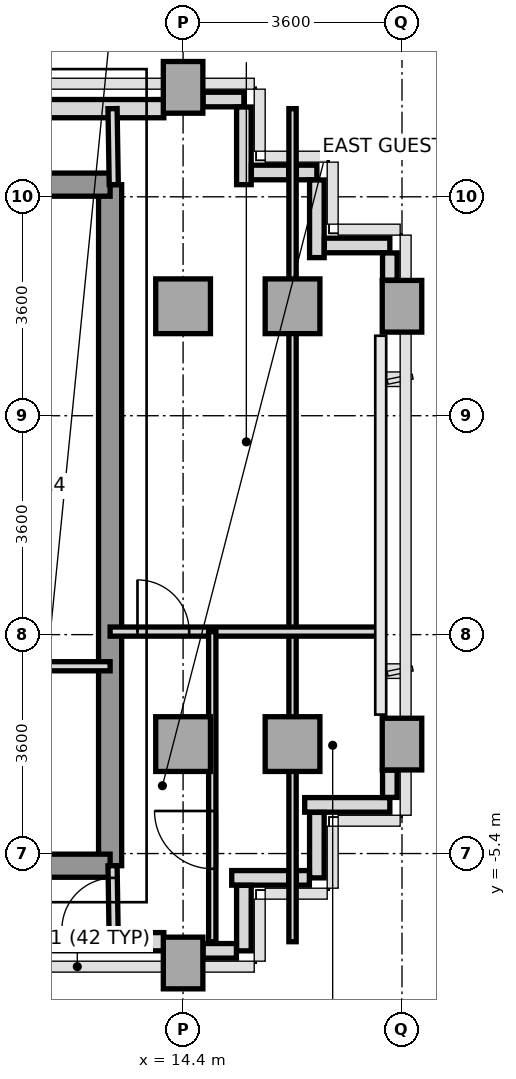
"""IFC4 building model, lengths in metres.
Left out: names, types, materials, properties, quantities, classifications, styles, units other than length and angle.
Written with IfcOpenShell. Run it as: python <this file> out.ifc"""

import sys

from ifc_helpers import new_model, si_unit, direction, frame, frame_2d, origin, origin_2d, place, context, subcontext, project, spatial, rectangle, extrude, source, transform, mapped, element, fill, save


model = new_model("IFC4")
c1 = context("Model", 3, precision=1e-05, world=origin(), true_north=direction((0.0, 1.0)))
c2 = subcontext(c1, "Body", "Model", "MODEL_VIEW")
j1 = project(units=[si_unit("LENGTHUNIT", "METRE"), si_unit("PLANEANGLEUNIT", "RADIAN")], contexts=[c1])
p1 = place(None, origin())
s1 = spatial("IfcSite", under=j1, at=p1, CompositionType="ELEMENT")
p2 = place(p1, origin())
s2 = spatial("IfcBuilding", under=s1, at=p2, CompositionType="ELEMENT")
p3 = place(p2, frame((0.0, 0.0, 191.0)))
s3 = spatial("IfcBuildingStorey", under=s2, at=p3, CompositionType="ELEMENT", Elevation=191.0)
m1 = source(origin(), c2, "Body", "SweptSolid", [
    extrude(rectangle(XDim=0.65, YDim=0.85, at=origin_2d()), origin(), (0.0, 0.0, 1.0), 3.2),
])
p4 = place(p3, frame((14.4, -7.2, 0.0), z_axis=(0.0, 0.0, 1.0), x_axis=(1.0, 0.0, 0.0)))
e1 = element("IfcColumn", 1, at=p4, inside=s3, PredefinedType="COLUMN", context=c2, shape_type="MappedRepresentation", body=[
    mapped(m1, transform((0.0, 0.0, 0.0), x_axis=(1.0, 0.0, 0.0), y_axis=(0.0, 1.0, 0.0), z_axis=(0.0, 0.0, 1.0), scale=1.0)),
])
m2 = source(origin(), c2, "Body", "SweptSolid", [
    extrude(rectangle(XDim=0.9, YDim=0.9, at=origin_2d()), origin(), (0.0, 0.0, 1.0), 3.2),
])
for number, where, z_axis, x_axis in (
    (2, (14.4, -3.6, 0.0), (0.0, 0.0, 1.0), (1.0, 0.0, 0.0)),
    (3, (14.4, 3.6, 0.0), (0.0, 0.0, 1.0), (1.0, 0.0, 0.0)),
):
    element("IfcColumn", number, at=place(p3, frame(where, z_axis=z_axis, x_axis=x_axis)), inside=s3, PredefinedType="COLUMN", context=c2, shape_type="MappedRepresentation", body=[
        mapped(m2, transform((0.0, 0.0, 0.0), x_axis=(1.0, 0.0, 0.0), y_axis=(0.0, 1.0, 0.0), z_axis=(0.0, 0.0, 1.0), scale=1.0)),
    ])
p5 = place(p3, frame((14.4, 7.2, 0.0), z_axis=(0.0, 0.0, 1.0), x_axis=(1.0, 0.0, 0.0)))
e4 = element("IfcColumn", 4, at=p5, inside=s3, PredefinedType="COLUMN", context=c2, shape_type="MappedRepresentation", body=[
    mapped(m1, transform((0.0, 0.0, 0.0), x_axis=(1.0, 0.0, 0.0), y_axis=(0.0, 1.0, 0.0), z_axis=(0.0, 0.0, 1.0), scale=1.0)),
])
for number, where, z_axis, x_axis in (
    (5, (16.2, -3.6, 0.0), (0.0, 0.0, 1.0), (1.0, 0.0, 0.0)),
    (6, (16.2, 3.6, 0.0), (0.0, 0.0, 1.0), (1.0, 0.0, 0.0)),
):
    element("IfcColumn", number, at=place(p3, frame(where, z_axis=z_axis, x_axis=x_axis)), inside=s3, PredefinedType="COLUMN", context=c2, shape_type="MappedRepresentation", body=[
        mapped(m2, transform((0.0, 0.0, 0.0), x_axis=(1.0, 0.0, 0.0), y_axis=(0.0, 1.0, 0.0), z_axis=(0.0, 0.0, 1.0), scale=1.0)),
    ])
for number, where, z_axis, x_axis in (
    (7, (18.0, -3.6, 0.0), (0.0, 0.0, 1.0), (1.0, 0.0, 0.0)),
    (8, (18.0, 3.6, 0.0), (0.0, 0.0, 1.0), (1.0, 0.0, 0.0)),
):
    element("IfcColumn", number, at=place(p3, frame(where, z_axis=z_axis, x_axis=x_axis)), inside=s3, PredefinedType="COLUMN", context=c2, shape_type="MappedRepresentation", body=[
        mapped(m1, transform((0.0, 0.0, 0.0), x_axis=(1.0, 0.0, 0.0), y_axis=(0.0, 1.0, 0.0), z_axis=(0.0, 0.0, 1.0), scale=1.0)),
    ])
p6 = place(p3, frame((11.448, 6.85, 0.0), z_axis=(0.0, 0.0, 1.0), x_axis=(1.0, 0.0, 0.0)))
e9 = element("IfcWall", 9, at=p6, inside=s3, PredefinedType="SOLIDWALL", context=c2, shape_type="SweptSolid", body=[
    extrude(rectangle(XDim=2.635, YDim=0.3, at=frame_2d((1.317, 0.0))), origin(), (0.0, 0.0, 1.0), 3.2),
])
p7 = place(p3, frame((11.75, -6.85, 0.0), z_axis=(0.0, 0.0, 1.0), x_axis=(1.0, 0.0, 0.0)))
e10 = element("IfcWall", 10, at=p7, inside=s3, PredefinedType="SOLIDWALL", context=c2, shape_type="SweptSolid", body=[
    extrude(rectangle(XDim=2.333, YDim=0.3, at=frame_2d((1.167, 0.0))), origin(), (0.0, 0.0, 1.0), 3.2),
])
p8 = place(p3, frame((17.8, -4.6, 0.0), z_axis=(0.0, 0.0, 1.0), x_axis=(-1.0, 0.0, 0.0)))
e11 = element("IfcWall", 11, at=p8, inside=s3, PredefinedType="PARAPET", context=c2, shape_type="SweptSolid", body=[
    extrude(rectangle(XDim=1.4, YDim=0.24, at=frame_2d((0.7, 0.0))), origin(), (0.0, 0.0, 1.0), 1.15),
])
p9 = place(p3, frame((16.6, -4.723, 0.0), z_axis=(0.0, 0.0, 1.0), x_axis=(0.0, -1.0, 0.0)))
e12 = element("IfcWall", 12, at=p9, inside=s3, PredefinedType="PARAPET", context=c2, shape_type="SweptSolid", body=[
    extrude(rectangle(XDim=1.077, YDim=0.24, at=frame_2d((0.539, 0.0))), origin(), (0.0, 0.0, 1.0), 1.15),
])
p10 = place(p3, frame((16.477, -5.8, 0.0), z_axis=(0.0, 0.0, 1.0), x_axis=(-1.0, 0.0, 0.0)))
e13 = element("IfcWall", 13, at=p10, inside=s3, PredefinedType="PARAPET", context=c2, shape_type="SweptSolid", body=[
    extrude(rectangle(XDim=0.214, YDim=0.24, at=frame_2d((0.107, 0.0))), origin(), (0.0, 0.0, 1.0), 1.15),
])
p11 = place(p3, frame((16.137, -5.8, 0.0), z_axis=(0.0, 0.0, 1.0), x_axis=(-1.0, 0.0, 0.0)))
e14 = element("IfcWall", 14, at=p11, inside=s3, PredefinedType="PARAPET", context=c2, shape_type="SweptSolid", body=[
    extrude(rectangle(XDim=0.937, YDim=0.24, at=frame_2d((0.469, 0.0))), origin(), (0.0, 0.0, 1.0), 1.15),
])
p12 = place(p3, frame((15.4, -5.923, 0.0), z_axis=(0.0, 0.0, 1.0), x_axis=(0.0, -1.0, 0.0)))
e15 = element("IfcWall", 15, at=p12, inside=s3, PredefinedType="PARAPET", context=c2, shape_type="SweptSolid", body=[
    extrude(rectangle(XDim=1.077, YDim=0.24, at=frame_2d((0.539, 0.0))), origin(), (0.0, 0.0, 1.0), 1.15),
])
p13 = place(p3, frame((15.277, -7.0, 0.0), z_axis=(0.0, 0.0, 1.0), x_axis=(-1.0, 0.0, 0.0)))
e16 = element("IfcWall", 16, at=p13, inside=s3, PredefinedType="PARAPET", context=c2, shape_type="SweptSolid", body=[
    extrude(rectangle(XDim=0.549, YDim=0.24, at=frame_2d((0.274, 0.0))), origin(), (0.0, 0.0, 1.0), 1.15),
])
p14 = place(p3, frame((14.728, 7.0, 0.0), z_axis=(0.0, 0.0, 1.0), x_axis=(1.0, 0.0, 0.0)))
e17 = element("IfcWall", 17, at=p14, inside=s3, PredefinedType="PARAPET", context=c2, shape_type="SweptSolid", body=[
    extrude(rectangle(XDim=0.672, YDim=0.24, at=frame_2d((0.336, 0.0))), origin(), (0.0, 0.0, 1.0), 1.15),
])
p15 = place(p3, frame((15.4, 6.877, 0.0), z_axis=(0.0, 0.0, 1.0), x_axis=(0.0, -1.0, 0.0)))
e18 = element("IfcWall", 18, at=p15, inside=s3, PredefinedType="PARAPET", context=c2, shape_type="SweptSolid", body=[
    extrude(rectangle(XDim=1.277, YDim=0.24, at=frame_2d((0.638, 0.0))), origin(), (0.0, 0.0, 1.0), 1.15),
])
p16 = place(p3, frame((15.523, 5.8, 0.0), z_axis=(0.0, 0.0, 1.0), x_axis=(1.0, 0.0, 0.0)))
e19 = element("IfcWall", 19, at=p16, inside=s3, PredefinedType="PARAPET", context=c2, shape_type="SweptSolid", body=[
    extrude(rectangle(XDim=0.614, YDim=0.24, at=frame_2d((0.307, 0.0))), origin(), (0.0, 0.0, 1.0), 1.15),
])
p17 = place(p3, frame((16.263, 5.8, 0.0), z_axis=(0.0, 0.0, 1.0), x_axis=(1.0, 0.0, 0.0)))
e20 = element("IfcWall", 20, at=p17, inside=s3, PredefinedType="PARAPET", context=c2, shape_type="SweptSolid", body=[
    extrude(rectangle(XDim=0.337, YDim=0.24, at=frame_2d((0.168, 0.0))), origin(), (0.0, 0.0, 1.0), 1.15),
])
p18 = place(p3, frame((16.6, 5.677, 0.0), z_axis=(0.0, 0.0, 1.0), x_axis=(0.0, -1.0, 0.0)))
e21 = element("IfcWall", 21, at=p18, inside=s3, PredefinedType="PARAPET", context=c2, shape_type="SweptSolid", body=[
    extrude(rectangle(XDim=1.277, YDim=0.24, at=frame_2d((0.639, 0.0))), origin(), (0.0, 0.0, 1.0), 1.15),
])
p19 = place(p3, frame((16.723, 4.6, 0.0), z_axis=(0.0, 0.0, 1.0), x_axis=(1.0, 0.0, 0.0)))
e22 = element("IfcWall", 22, at=p19, inside=s3, PredefinedType="PARAPET", context=c2, shape_type="SweptSolid", body=[
    extrude(rectangle(XDim=1.077, YDim=0.24, at=frame_2d((0.539, 0.0))), origin(), (0.0, 0.0, 1.0), 1.15),
])
for number, where, z_axis, x_axis in (
    (23, (17.8, 4.477, 0.0), (0.0, 0.0, 1.0), (0.0, -1.0, 0.0)),
    (24, (17.8, -4.028, 0.0), (0.0, 0.0, 1.0), (0.0, -1.0, 0.0)),
):
    element("IfcWall", number, at=place(p3, frame(where, z_axis=z_axis, x_axis=x_axis)), inside=s3, PredefinedType="PARAPET", context=c2, shape_type="SweptSolid", body=[
        extrude(rectangle(XDim=0.449, YDim=0.24, at=frame_2d((0.225, 0.0))), origin(), (0.0, 0.0, 1.0), 1.15),
    ])
p20 = place(p3, frame((13.2, -5.6, 0.0), z_axis=(0.0, 0.0, 1.0), x_axis=(0.0, 1.0, 0.0)))
e25 = element("IfcWall", 25, at=p20, inside=s3, PredefinedType="SHEAR", context=c2, shape_type="SweptSolid", body=[
    extrude(rectangle(XDim=11.2, YDim=0.38, at=frame_2d((5.6, 0.0))), origin(), (0.0, 0.0, 1.0), 3.2),
])
p21 = place(p3, frame((11.356, 5.6, 0.0), z_axis=(0.0, 0.0, 1.0), x_axis=(1.0, 0.0, 0.0)))
e26 = element("IfcWall", 26, at=p21, inside=s3, PredefinedType="SHEAR", context=c2, shape_type="SweptSolid", body=[
    extrude(rectangle(XDim=1.844, YDim=0.38, at=frame_2d((0.922, 0.0))), origin(), (0.0, 0.0, 1.0), 3.2),
])
p22 = place(p3, frame((5.4, -5.6, 0.0), z_axis=(0.0, 0.0, 1.0), x_axis=(1.0, 0.0, 0.0)))
e27 = element("IfcWall", 27, at=p22, inside=s3, PredefinedType="SHEAR", context=c2, shape_type="SweptSolid", body=[
    extrude(rectangle(XDim=7.8, YDim=0.38, at=frame_2d((3.9, 0.0))), origin(), (0.0, 0.0, 1.0), 3.2),
])
p23 = place(p22, frame((5.85, 0.0, 0.0)))
e28 = element("IfcOpeningElement", 28, at=p23, cuts=e27, PredefinedType="OPENING", context=c2, shape_type="SweptSolid", body=[
    extrude(rectangle(XDim=0.8, YDim=2.1, at=frame_2d((0.4, 1.05))), frame((0.0, 0.2, 0.0), z_axis=(0.0, -1.0, 0.0), x_axis=(1.0, 0.0, 0.0)), (0.0, 0.0, 1.0), 0.4),
])
p24 = place(p22, frame((1.2, 0.0, 0.0)))
e29 = element("IfcOpeningElement", 29, at=p24, cuts=e27, PredefinedType="OPENING", context=c2, shape_type="SweptSolid", body=[
    extrude(rectangle(XDim=0.85, YDim=2.1, at=frame_2d((0.425, 1.05))), frame((0.0, 0.2, 0.0), z_axis=(0.0, -1.0, 0.0), x_axis=(1.0, 0.0, 0.0)), (0.0, 0.0, 1.0), 0.4),
])
p25 = place(p22, frame((3.4, 0.0, 0.0)))
e30 = element("IfcOpeningElement", 30, at=p25, cuts=e27, PredefinedType="OPENING", context=c2, shape_type="SweptSolid", body=[
    extrude(rectangle(XDim=0.85, YDim=2.1, at=frame_2d((0.425, 1.05))), frame((0.0, 0.2, 0.0), z_axis=(0.0, -1.0, 0.0), x_axis=(1.0, 0.0, 0.0)), (0.0, 0.0, 1.0), 0.4),
])
p26 = place(p3, frame((11.02, -2.32, 0.0), z_axis=(0.0, 0.0, 1.0), x_axis=(1.0, 0.0, 0.0)))
e31 = element("IfcWall", 31, at=p26, inside=s3, PredefinedType="PARTITIONING", context=c2, shape_type="SweptSolid", body=[
    extrude(rectangle(XDim=2.18, YDim=0.15, at=frame_2d((1.09, 0.0))), origin(), (0.0, 0.0, 1.0), 3.2),
])
p27 = place(p3, frame((13.26, -6.85, 0.0), z_axis=(0.0, 0.0, 1.0), x_axis=(-0.016013571389, 0.999871774545, 0.0)))
e32 = element("IfcWall", 32, at=p27, inside=s3, PredefinedType="PARTITIONING", context=c2, shape_type="SweptSolid", body=[
    extrude(rectangle(XDim=1.25, YDim=0.15, at=frame_2d((0.625, 0.0))), origin(), (0.0, 0.0, 1.0), 3.2),
])
p28 = place(p27, frame((0.2, 0.0, 0.0)))
e33 = element("IfcOpeningElement", 33, at=p28, cuts=e32, PredefinedType="OPENING", context=c2, shape_type="SweptSolid", body=[
    extrude(rectangle(XDim=0.85, YDim=2.1, at=frame_2d((0.425, 1.05))), frame((0.0, 0.085, 0.0), z_axis=(0.0, -1.0, 0.0), x_axis=(1.0, 0.0, 0.0)), (0.0, 0.0, 1.0), 0.17),
])
p29 = place(p3, frame((13.26, 5.6, 0.0), z_axis=(0.0, 0.0, 1.0), x_axis=(-0.016013571389, 0.999871774545, 0.0)))
e34 = element("IfcWall", 34, at=p29, inside=s3, PredefinedType="PARTITIONING", context=c2, shape_type="SweptSolid", body=[
    extrude(rectangle(XDim=1.25, YDim=0.15, at=frame_2d((0.625, 0.0))), origin(), (0.0, 0.0, 1.0), 3.2),
])
p30 = place(p3, frame((16.2, -6.85, 0.0), z_axis=(0.0, 0.0, 1.0), x_axis=(0.0, 1.0, 0.0)))
e35 = element("IfcWall", 35, at=p30, inside=s3, PredefinedType="PARTITIONING", context=c2, shape_type="SweptSolid", body=[
    extrude(rectangle(XDim=13.7, YDim=0.12, at=frame_2d((6.85, 0.0))), origin(), (0.0, 0.0, 1.0), 2.8),
])
p31 = place(p3, frame((13.2, -1.75, 0.0), z_axis=(0.0, 0.0, 1.0), x_axis=(1.0, 0.0, 0.0)))
e36 = element("IfcWall", 36, at=p31, inside=s3, PredefinedType="PARTITIONING", context=c2, shape_type="SweptSolid", body=[
    extrude(rectangle(XDim=4.45, YDim=0.15, at=frame_2d((2.225, 0.0))), origin(), (0.0, 0.0, 1.0), 2.8),
])
p32 = place(p31, frame((0.45, 0.0, 0.0)))
e37 = element("IfcOpeningElement", 37, at=p32, cuts=e36, PredefinedType="OPENING", context=c2, shape_type="SweptSolid", body=[
    extrude(rectangle(XDim=0.85, YDim=2.1, at=frame_2d((0.425, 1.05))), frame((0.0, 0.085, 0.0), z_axis=(0.0, -1.0, 0.0), x_axis=(1.0, 0.0, 0.0)), (0.0, 0.0, 1.0), 0.17),
])
p33 = place(p3, frame((14.88, -6.85, 0.0), z_axis=(0.0, 0.0, 1.0), x_axis=(0.0, 1.0, 0.0)))
e38 = element("IfcWall", 38, at=p33, inside=s3, PredefinedType="PARTITIONING", context=c2, shape_type="SweptSolid", body=[
    extrude(rectangle(XDim=5.1, YDim=0.12, at=frame_2d((2.55, 0.0))), origin(), (0.0, 0.0, 1.0), 3.2),
])
p34 = place(p33, frame((1.2, 0.0, 0.0)))
e39 = element("IfcOpeningElement", 39, at=p34, cuts=e38, PredefinedType="OPENING", context=c2, shape_type="SweptSolid", body=[
    extrude(rectangle(XDim=0.95, YDim=2.15, at=frame_2d((0.475, 1.075))), frame((0.0, 0.07, 0.0), z_axis=(0.0, -1.0, 0.0), x_axis=(1.0, 0.0, 0.0)), (0.0, 0.0, 1.0), 0.14),
])
m3 = source(origin(), c2, "Body", "SweptSolid", [
    extrude(rectangle(XDim=0.85, YDim=2.1, at=frame_2d((0.425, 1.05))), frame((0.0, 0.025, 0.0), z_axis=(0.0, -1.0, 0.0), x_axis=(1.0, 0.0, 0.0)), (0.0, 0.0, 1.0), 0.05),
])
p35 = place(p28, origin())
e40 = element("IfcDoor", 40, at=p35, inside=s3, OperationType="SINGLE_SWING_LEFT", PredefinedType="DOOR", context=c2, shape_type="MappedRepresentation", body=[
    mapped(m3, transform((0.0, 0.0, 0.0), x_axis=(1.0, 0.0, 0.0), y_axis=(0.0, 1.0, 0.0), z_axis=(0.0, 0.0, 1.0), scale=1.0)),
])
fill(e33, e40)
m4 = source(origin(), c2, "Body", "SweptSolid", [
    extrude(rectangle(XDim=0.95, YDim=2.15, at=frame_2d((0.475, 1.075))), frame((0.0, 0.025, 0.0), z_axis=(0.0, -1.0, 0.0), x_axis=(1.0, 0.0, 0.0)), (0.0, 0.0, 1.0), 0.05),
])
p36 = place(p34, origin())
e41 = element("IfcDoor", 41, at=p36, inside=s3, OperationType="SINGLE_SWING_RIGHT", PredefinedType="DOOR", context=c2, shape_type="MappedRepresentation", body=[
    mapped(m4, transform((0.0, 0.0, 0.0), x_axis=(1.0, 0.0, 0.0), y_axis=(0.0, 1.0, 0.0), z_axis=(0.0, 0.0, 1.0), scale=1.0)),
])
fill(e39, e41)
p37 = place(p32, origin())
e42 = element("IfcDoor", 42, at=p37, inside=s3, OperationType="SINGLE_SWING_LEFT", PredefinedType="DOOR", context=c2, shape_type="MappedRepresentation", body=[
    mapped(m3, transform((0.0, 0.0, 0.0), x_axis=(1.0, 0.0, 0.0), y_axis=(0.0, 1.0, 0.0), z_axis=(0.0, 0.0, 1.0), scale=1.0)),
])
fill(e37, e42)
save(model, sys.argv[1])
